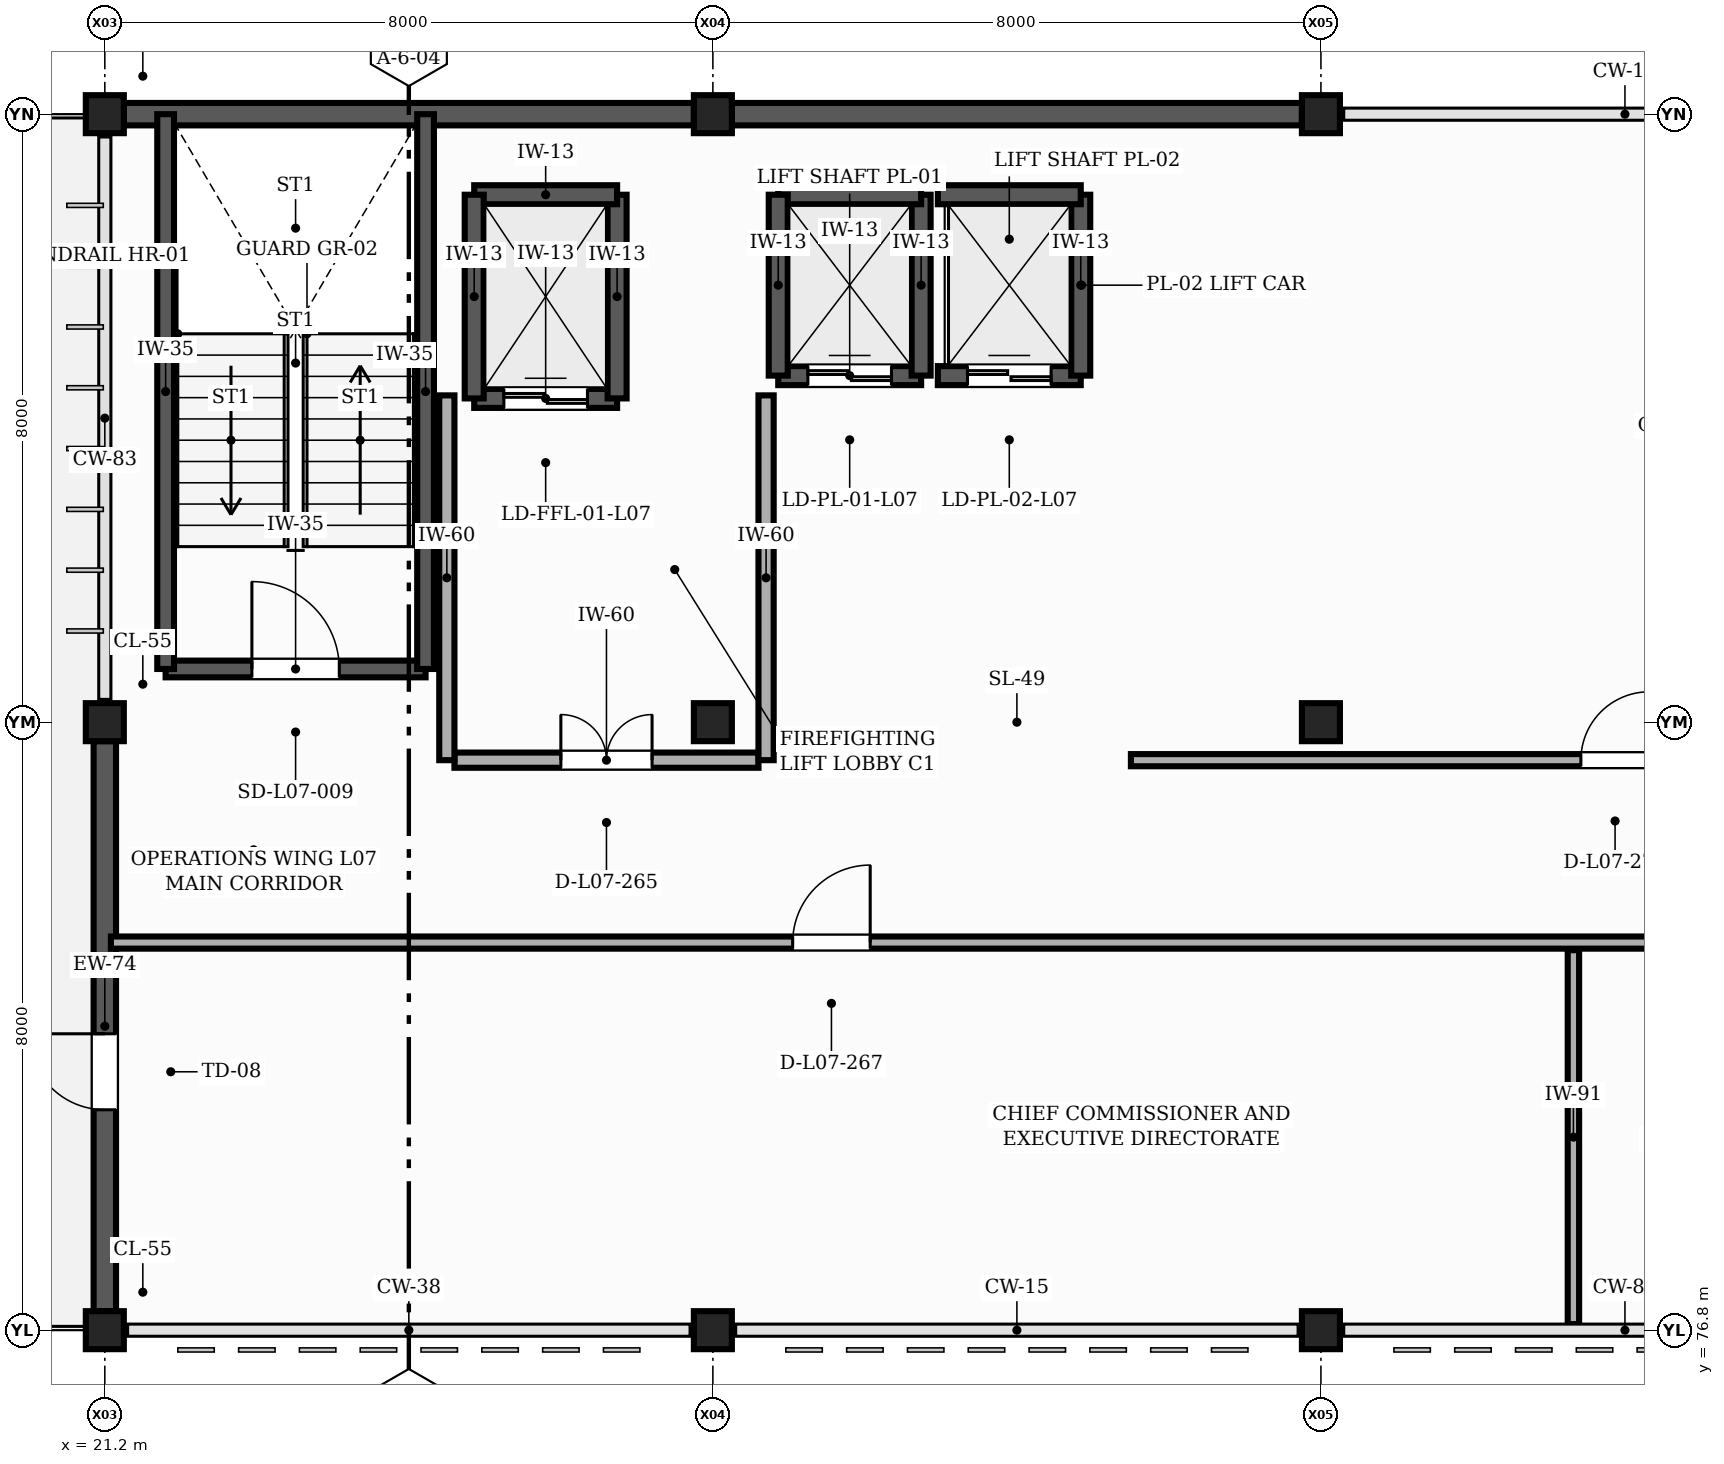
"""IFC4 building model, lengths in metres.
Left out: names, types, materials, properties, quantities, classifications, styles, units other than length and angle.
Written with IfcOpenShell. Run it as: python <this file> out.ifc"""

import sys

from ifc_helpers import new_model, si_unit, direction, frame, frame_2d, origin, origin_2d, place, context, subcontext, project, spatial, rectangle, extrude, element, fill, save


model = new_model("IFC4")
c1 = context("Model", 3, precision=1e-05, world=origin(), true_north=direction((0.0, 1.0)))
c2 = subcontext(c1, "Body", "Model", "MODEL_VIEW")
j1 = project(units=[si_unit("LENGTHUNIT", "METRE"), si_unit("PLANEANGLEUNIT", "RADIAN")], contexts=[c1])
p1 = place(None, origin())
s1 = spatial("IfcSite", under=j1, at=p1, CompositionType="ELEMENT")
p2 = place(p1, origin())
s2 = spatial("IfcBuilding", under=s1, at=p2, CompositionType="ELEMENT")
p3 = place(p2, frame((0.0, 0.0, 29.7)))
s3 = spatial("IfcBuildingStorey", under=s2, at=p3, CompositionType="ELEMENT", Elevation=29.7)
for number, where, z_axis, x_axis in (
    (1, (21.2, 76.8, 0.0), (0.0, 0.0, 1.0), (1.0, 0.0, 0.0)),
    (2, (21.2, 84.8, 0.0), (0.0, 0.0, 1.0), (1.0, 0.0, 0.0)),
    (3, (21.2, 92.8, 0.0), (0.0, 0.0, 1.0), (1.0, 0.0, 0.0)),
    (4, (29.2, 76.8, 0.0), (0.0, 0.0, 1.0), (1.0, 0.0, 0.0)),
    (5, (29.2, 84.8, 0.0), (0.0, 0.0, 1.0), (1.0, 0.0, 0.0)),
    (6, (29.2, 92.8, 0.0), (0.0, 0.0, 1.0), (1.0, 0.0, 0.0)),
    (7, (37.2, 76.8, 0.0), (0.0, 0.0, 1.0), (1.0, 0.0, 0.0)),
    (8, (37.2, 84.8, 0.0), (0.0, 0.0, 1.0), (1.0, 0.0, 0.0)),
    (9, (37.2, 92.8, 0.0), (0.0, 0.0, 1.0), (1.0, 0.0, 0.0)),
):
    element("IfcColumn", number, at=place(p3, frame(where, z_axis=z_axis, x_axis=x_axis)), inside=s3, PredefinedType="COLUMN", context=c2, shape_type="SweptSolid", body=[
        extrude(rectangle(XDim=0.5, YDim=0.5, at=origin_2d()), origin(), (0.0, 0.0, 1.0), 3.9),
    ])
p4 = place(p3, frame((36.95, 92.8, 0.0), z_axis=(0.0, 0.0, 1.0), x_axis=(-1.0, 0.0, 0.0)))
e10 = element("IfcWall", 10, at=p4, inside=s3, PredefinedType="SOLIDWALL", context=c2, shape_type="SweptSolid", body=[
    extrude(rectangle(XDim=7.5, YDim=0.295, at=frame_2d((3.75, 0.0))), origin(), (0.0, 0.0, 1.0), 2.98),
])
p5 = place(p3, frame((28.95, 92.8, 0.0), z_axis=(0.0, 0.0, 1.0), x_axis=(-1.0, 0.0, 0.0)))
e11 = element("IfcWall", 11, at=p5, inside=s3, PredefinedType="SOLIDWALL", context=c2, shape_type="SweptSolid", body=[
    extrude(rectangle(XDim=7.5, YDim=0.295, at=frame_2d((3.75, 0.0))), origin(), (0.0, 0.0, 1.0), 3.64),
])
p6 = place(p3, frame((21.2, 84.55, 0.0), z_axis=(0.0, 0.0, 1.0), x_axis=(0.0, -1.0, 0.0)))
e12 = element("IfcWall", 12, at=p6, inside=s3, PredefinedType="SOLIDWALL", context=c2, shape_type="SweptSolid", body=[
    extrude(rectangle(XDim=7.5, YDim=0.295, at=frame_2d((3.75, 0.0))), origin(), (0.0, 0.0, 1.0), 2.98),
])
p7 = place(p6, frame((3.85, 0.0, 0.0)))
e13 = element("IfcOpeningElement", 13, at=p7, cuts=e12, PredefinedType="OPENING", context=c2, shape_type="SweptSolid", body=[
    extrude(rectangle(XDim=1.0, YDim=2.15, at=frame_2d((0.5, 1.075))), frame((0.0, 0.157, 0.0), z_axis=(0.0, -1.0, 0.0), x_axis=(1.0, 0.0, 0.0)), (0.0, 0.0, 1.0), 0.315),
])
p8 = place(p3, frame((22.0, 85.5, 0.0), z_axis=(0.0, 0.0, 1.0), x_axis=(1.0, 0.0, 0.0)))
e14 = element("IfcWall", 14, at=p8, inside=s3, PredefinedType="SHEAR", context=c2, shape_type="SweptSolid", body=[
    extrude(rectangle(XDim=3.42, YDim=0.22, at=frame_2d((1.71, 0.0))), origin(), (0.0, 0.0, 1.0), 3.9),
])
p9 = place(p8, frame((1.135, 0.0, 0.0)))
e15 = element("IfcOpeningElement", 15, at=p9, cuts=e14, PredefinedType="OPENING", context=c2, shape_type="SweptSolid", body=[
    extrude(rectangle(XDim=1.15, YDim=2.15, at=frame_2d((0.575, 1.075))), frame((0.0, 0.12, 0.0), z_axis=(0.0, -1.0, 0.0), x_axis=(1.0, 0.0, 0.0)), (0.0, 0.0, 1.0), 0.24),
])
for number, where, z_axis, x_axis in (
    (16, (25.42, 85.5, 0.0), (0.0, 0.0, 1.0), (0.0, 1.0, 0.0)),
    (17, (22.0, 92.8, 0.0), (0.0, 0.0, 1.0), (0.0, -1.0, 0.0)),
):
    element("IfcWall", number, at=place(p3, frame(where, z_axis=z_axis, x_axis=x_axis)), inside=s3, PredefinedType="SHEAR", context=c2, shape_type="SweptSolid", body=[
        extrude(rectangle(XDim=7.3, YDim=0.22, at=frame_2d((3.65, 0.0))), origin(), (0.0, 0.0, 1.0), 3.9),
    ])
p10 = place(p3, frame((26.06, 89.06, 0.0), z_axis=(0.0, 0.0, 1.0), x_axis=(1.0, 0.0, 0.0)))
e18 = element("IfcWall", 18, at=p10, inside=s3, PredefinedType="SHEAR", context=c2, shape_type="SweptSolid", body=[
    extrude(rectangle(XDim=1.88, YDim=0.25, at=frame_2d((0.94, 0.0))), origin(), (0.0, 0.0, 1.0), 5.52),
])
p11 = place(p10, frame((0.39, 0.0, 0.0)))
e19 = element("IfcOpeningElement", 19, at=p11, cuts=e18, PredefinedType="OPENING", context=c2, shape_type="SweptSolid", body=[
    extrude(rectangle(XDim=1.1, YDim=2.2, at=frame_2d((0.55, 1.1))), frame((0.0, 0.135, 0.0), z_axis=(0.0, -1.0, 0.0), x_axis=(1.0, 0.0, 0.0)), (0.0, 0.0, 1.0), 0.27),
])
p12 = place(p3, frame((27.94, 89.06, 0.0), z_axis=(0.0, 0.0, 1.0), x_axis=(0.0, 1.0, 0.0)))
e20 = element("IfcWall", 20, at=p12, inside=s3, PredefinedType="SHEAR", context=c2, shape_type="SweptSolid", body=[
    extrude(rectangle(XDim=2.68, YDim=0.25, at=frame_2d((1.34, 0.0))), origin(), (0.0, 0.0, 1.0), 5.52),
])
p13 = place(p3, frame((27.94, 91.74, 0.0), z_axis=(0.0, 0.0, 1.0), x_axis=(-1.0, 0.0, 0.0)))
e21 = element("IfcWall", 21, at=p13, inside=s3, PredefinedType="SHEAR", context=c2, shape_type="SweptSolid", body=[
    extrude(rectangle(XDim=1.88, YDim=0.25, at=frame_2d((0.94, 0.0))), origin(), (0.0, 0.0, 1.0), 5.52),
])
p14 = place(p3, frame((26.06, 91.74, 0.0), z_axis=(0.0, 0.0, 1.0), x_axis=(0.0, -1.0, 0.0)))
e22 = element("IfcWall", 22, at=p14, inside=s3, PredefinedType="SHEAR", context=c2, shape_type="SweptSolid", body=[
    extrude(rectangle(XDim=2.68, YDim=0.25, at=frame_2d((1.34, 0.0))), origin(), (0.0, 0.0, 1.0), 5.52),
])
p15 = place(p3, frame((30.06, 89.36, 0.0), z_axis=(0.0, 0.0, 1.0), x_axis=(1.0, 0.0, 0.0)))
e23 = element("IfcWall", 23, at=p15, inside=s3, PredefinedType="SHEAR", context=c2, shape_type="SweptSolid", body=[
    extrude(rectangle(XDim=1.88, YDim=0.25, at=frame_2d((0.94, 0.0))), origin(), (0.0, 0.0, 1.0), 5.52),
])
p16 = place(p15, frame((0.39, 0.0, 0.0)))
e24 = element("IfcOpeningElement", 24, at=p16, cuts=e23, PredefinedType="OPENING", context=c2, shape_type="SweptSolid", body=[
    extrude(rectangle(XDim=1.1, YDim=2.2, at=frame_2d((0.55, 1.1))), frame((0.0, 0.135, 0.0), z_axis=(0.0, -1.0, 0.0), x_axis=(1.0, 0.0, 0.0)), (0.0, 0.0, 1.0), 0.27),
])
p17 = place(p3, frame((31.94, 89.36, 0.0), z_axis=(0.0, 0.0, 1.0), x_axis=(0.0, 1.0, 0.0)))
e25 = element("IfcWall", 25, at=p17, inside=s3, PredefinedType="SHEAR", context=c2, shape_type="SweptSolid", body=[
    extrude(rectangle(XDim=2.38, YDim=0.25, at=frame_2d((1.19, 0.0))), origin(), (0.0, 0.0, 1.0), 5.52),
])
p18 = place(p3, frame((31.94, 91.74, 0.0), z_axis=(0.0, 0.0, 1.0), x_axis=(-1.0, 0.0, 0.0)))
e26 = element("IfcWall", 26, at=p18, inside=s3, PredefinedType="SHEAR", context=c2, shape_type="SweptSolid", body=[
    extrude(rectangle(XDim=1.88, YDim=0.25, at=frame_2d((0.94, 0.0))), origin(), (0.0, 0.0, 1.0), 5.52),
])
p19 = place(p3, frame((30.06, 91.74, 0.0), z_axis=(0.0, 0.0, 1.0), x_axis=(0.0, -1.0, 0.0)))
e27 = element("IfcWall", 27, at=p19, inside=s3, PredefinedType="SHEAR", context=c2, shape_type="SweptSolid", body=[
    extrude(rectangle(XDim=2.38, YDim=0.25, at=frame_2d((1.19, 0.0))), origin(), (0.0, 0.0, 1.0), 5.52),
])
p20 = place(p3, frame((32.16, 89.36, 0.0), z_axis=(0.0, 0.0, 1.0), x_axis=(1.0, 0.0, 0.0)))
e28 = element("IfcWall", 28, at=p20, inside=s3, PredefinedType="SHEAR", context=c2, shape_type="SweptSolid", body=[
    extrude(rectangle(XDim=1.88, YDim=0.25, at=frame_2d((0.94, 0.0))), origin(), (0.0, 0.0, 1.0), 5.52),
])
p21 = place(p20, frame((0.39, 0.0, 0.0)))
e29 = element("IfcOpeningElement", 29, at=p21, cuts=e28, PredefinedType="OPENING", context=c2, shape_type="SweptSolid", body=[
    extrude(rectangle(XDim=1.1, YDim=2.2, at=frame_2d((0.55, 1.1))), frame((0.0, 0.135, 0.0), z_axis=(0.0, -1.0, 0.0), x_axis=(1.0, 0.0, 0.0)), (0.0, 0.0, 1.0), 0.27),
])
p22 = place(p3, frame((34.04, 89.36, 0.0), z_axis=(0.0, 0.0, 1.0), x_axis=(0.0, 1.0, 0.0)))
e30 = element("IfcWall", 30, at=p22, inside=s3, PredefinedType="SHEAR", context=c2, shape_type="SweptSolid", body=[
    extrude(rectangle(XDim=2.38, YDim=0.25, at=frame_2d((1.19, 0.0))), origin(), (0.0, 0.0, 1.0), 5.52),
])
p23 = place(p3, frame((34.04, 91.74, 0.0), z_axis=(0.0, 0.0, 1.0), x_axis=(-1.0, 0.0, 0.0)))
e31 = element("IfcWall", 31, at=p23, inside=s3, PredefinedType="SHEAR", context=c2, shape_type="SweptSolid", body=[
    extrude(rectangle(XDim=1.88, YDim=0.25, at=frame_2d((0.94, 0.0))), origin(), (0.0, 0.0, 1.0), 5.52),
])
p24 = place(p3, frame((25.8, 84.3, 0.0), z_axis=(0.0, 0.0, 1.0), x_axis=(1.0, 0.0, 0.0)))
e32 = element("IfcWall", 32, at=p24, inside=s3, PredefinedType="PARTITIONING", context=c2, shape_type="SweptSolid", body=[
    extrude(rectangle(XDim=4.0, YDim=0.2, at=frame_2d((2.0, 0.0))), origin(), (0.0, 0.0, 1.0), 2.915),
])
p25 = place(p24, frame((1.4, 0.0, 0.0)))
e33 = element("IfcOpeningElement", 33, at=p25, cuts=e32, PredefinedType="OPENING", context=c2, shape_type="SweptSolid", body=[
    extrude(rectangle(XDim=1.2, YDim=2.15, at=frame_2d((0.6, 1.075))), frame((0.0, 0.11, 0.0), z_axis=(0.0, -1.0, 0.0), x_axis=(1.0, 0.0, 0.0)), (0.0, 0.0, 1.0), 0.22),
])
p26 = place(p3, frame((25.7, 84.3, 0.0), z_axis=(0.0, 0.0, 1.0), x_axis=(0.0, 1.0, 0.0)))
e34 = element("IfcWall", 34, at=p26, inside=s3, PredefinedType="PARTITIONING", context=c2, shape_type="SweptSolid", body=[
    extrude(rectangle(XDim=4.8, YDim=0.2, at=frame_2d((2.4, 0.0))), origin(), (0.0, 0.0, 1.0), 3.065),
])
p27 = place(p3, frame((29.9, 84.3, 0.0), z_axis=(0.0, 0.0, 1.0), x_axis=(0.0, 1.0, 0.0)))
e35 = element("IfcWall", 35, at=p27, inside=s3, PredefinedType="PARTITIONING", context=c2, shape_type="SweptSolid", body=[
    extrude(rectangle(XDim=4.8, YDim=0.2, at=frame_2d((2.4, 0.0))), origin(), (0.0, 0.0, 1.0), 2.765),
])
p28 = place(p3, frame((40.522, 76.88, 0.0), z_axis=(0.0, 0.0, 1.0), x_axis=(0.0, 1.0, 0.0)))
e36 = element("IfcWall", 36, at=p28, inside=s3, PredefinedType="PARTITIONING", context=c2, shape_type="SweptSolid", body=[
    extrude(rectangle(XDim=4.92, YDim=0.15, at=frame_2d((2.46, 0.0))), origin(), (0.0, 0.0, 1.0), 2.965),
])
p29 = place(p3, frame((21.28, 81.9, 0.0), z_axis=(0.0, 0.0, 1.0), x_axis=(1.0, 0.0, 0.0)))
e37 = element("IfcWall", 37, at=p29, inside=s3, PredefinedType="PARTITIONING", context=c2, shape_type="SweptSolid", body=[
    extrude(rectangle(XDim=64.64, YDim=0.16, at=frame_2d((32.32, 0.0))), origin(), (0.0, 0.0, 1.0), 2.915),
])
p30 = place(p29, frame((8.97, 0.0, 0.0)))
e38 = element("IfcOpeningElement", 38, at=p30, cuts=e37, PredefinedType="OPENING", context=c2, shape_type="SweptSolid", body=[
    extrude(rectangle(XDim=1.02, YDim=2.12, at=frame_2d((0.51, 1.06))), frame((0.0, 0.09, 0.0), z_axis=(0.0, -1.0, 0.0), x_axis=(1.0, 0.0, 0.0)), (0.0, 0.0, 1.0), 0.18),
])
p31 = place(p29, frame((26.84, 0.0, 0.0)))
e39 = element("IfcOpeningElement", 39, at=p31, cuts=e37, PredefinedType="OPENING", context=c2, shape_type="SweptSolid", body=[
    extrude(rectangle(XDim=1.05, YDim=2.1, at=frame_2d((0.525, 1.05))), frame((0.0, 0.09, 0.0), z_axis=(0.0, -1.0, 0.0), x_axis=(1.0, 0.0, 0.0)), (0.0, 0.0, 1.0), 0.18),
])
p32 = place(p29, frame((42.89, 0.0, 0.0)))
e40 = element("IfcOpeningElement", 40, at=p32, cuts=e37, PredefinedType="OPENING", context=c2, shape_type="SweptSolid", body=[
    extrude(rectangle(XDim=1.08, YDim=2.14, at=frame_2d((0.54, 1.07))), frame((0.0, 0.09, 0.0), z_axis=(0.0, -1.0, 0.0), x_axis=(1.0, 0.0, 0.0)), (0.0, 0.0, 1.0), 0.18),
])
p33 = place(p29, frame((57.2, 0.0, 0.0)))
e41 = element("IfcOpeningElement", 41, at=p33, cuts=e37, PredefinedType="OPENING", context=c2, shape_type="SweptSolid", body=[
    extrude(rectangle(XDim=1.1, YDim=2.1, at=frame_2d((0.55, 1.05))), frame((0.0, 0.09, 0.0), z_axis=(0.0, -1.0, 0.0), x_axis=(1.0, 0.0, 0.0)), (0.0, 0.0, 1.0), 0.18),
])
p34 = place(p3, frame((34.7, 84.3, 0.0), z_axis=(0.0, 0.0, 1.0), x_axis=(1.0, 0.0, 0.0)))
e42 = element("IfcWall", 42, at=p34, inside=s3, PredefinedType="PARTITIONING", context=c2, shape_type="SweptSolid", body=[
    extrude(rectangle(XDim=35.4, YDim=0.16, at=frame_2d((17.7, 0.0))), origin(), (0.0, 0.0, 1.0), 2.915),
])
p35 = place(p34, frame((5.92, 0.0, 0.0)))
e43 = element("IfcOpeningElement", 43, at=p35, cuts=e42, PredefinedType="OPENING", context=c2, shape_type="SweptSolid", body=[
    extrude(rectangle(XDim=0.9, YDim=2.1, at=frame_2d((0.45, 1.05))), frame((0.0, 0.09, 0.0), z_axis=(0.0, -1.0, 0.0), x_axis=(1.0, 0.0, 0.0)), (0.0, 0.0, 1.0), 0.18),
])
p36 = place(p34, frame((17.2, 0.0, 0.0)))
e44 = element("IfcOpeningElement", 44, at=p36, cuts=e42, PredefinedType="OPENING", context=c2, shape_type="SweptSolid", body=[
    extrude(rectangle(XDim=0.95, YDim=2.15, at=frame_2d((0.475, 1.075))), frame((0.0, 0.09, 0.0), z_axis=(0.0, -1.0, 0.0), x_axis=(1.0, 0.0, 0.0)), (0.0, 0.0, 1.0), 0.18),
])
p37 = place(p34, frame((28.48, 0.0, 0.0)))
e45 = element("IfcOpeningElement", 45, at=p37, cuts=e42, PredefinedType="OPENING", context=c2, shape_type="SweptSolid", body=[
    extrude(rectangle(XDim=0.95, YDim=2.1, at=frame_2d((0.475, 1.05))), frame((0.0, 0.09, 0.0), z_axis=(0.0, -1.0, 0.0), x_axis=(1.0, 0.0, 0.0)), (0.0, 0.0, 1.0), 0.18),
])
p38 = place(p7, frame((1.0, 0.0, 0.0), z_axis=(0.0, 0.0, 1.0), x_axis=(-1.0, 0.0, 0.0)))
e46 = element("IfcDoor", 46, at=p38, inside=s3, OperationType="SINGLE_SWING_RIGHT", PredefinedType="DOOR", context=c2, shape_type="SweptSolid", body=[
    extrude(rectangle(XDim=1.0, YDim=2.15, at=frame_2d((0.5, 1.075))), frame((0.0, 0.025, 0.0), z_axis=(0.0, -1.0, 0.0), x_axis=(1.0, 0.0, 0.0)), (0.0, 0.0, 1.0), 0.05),
])
fill(e13, e46)
p39 = place(p9, origin())
e47 = element("IfcDoor", 47, at=p39, inside=s3, OperationType="SINGLE_SWING_LEFT", PredefinedType="DOOR", context=c2, shape_type="SweptSolid", body=[
    extrude(rectangle(XDim=1.15, YDim=2.15, at=frame_2d((0.575, 1.075))), frame((0.0, 0.025, 0.0), z_axis=(0.0, -1.0, 0.0), x_axis=(1.0, 0.0, 0.0)), (0.0, 0.0, 1.0), 0.05),
])
fill(e15, e47)
p40 = place(p11, origin())
e48 = element("IfcDoor", 48, at=p40, inside=s3, OperationType="DOUBLE_DOOR_SLIDING", PredefinedType="DOOR", context=c2, shape_type="SweptSolid", body=[
    extrude(rectangle(XDim=1.1, YDim=2.2, at=frame_2d((0.55, 1.1))), frame((0.0, 0.025, 0.0), z_axis=(0.0, -1.0, 0.0), x_axis=(1.0, 0.0, 0.0)), (0.0, 0.0, 1.0), 0.05),
])
fill(e19, e48)
p41 = place(p16, origin())
e49 = element("IfcDoor", 49, at=p41, inside=s3, OperationType="DOUBLE_DOOR_SLIDING", PredefinedType="DOOR", context=c2, shape_type="SweptSolid", body=[
    extrude(rectangle(XDim=1.1, YDim=2.2, at=frame_2d((0.55, 1.1))), frame((0.0, 0.025, 0.0), z_axis=(0.0, -1.0, 0.0), x_axis=(1.0, 0.0, 0.0)), (0.0, 0.0, 1.0), 0.05),
])
fill(e24, e49)
p42 = place(p21, origin())
e50 = element("IfcDoor", 50, at=p42, inside=s3, OperationType="DOUBLE_DOOR_SLIDING", PredefinedType="DOOR", context=c2, shape_type="SweptSolid", body=[
    extrude(rectangle(XDim=1.1, YDim=2.2, at=frame_2d((0.55, 1.1))), frame((0.0, 0.025, 0.0), z_axis=(0.0, -1.0, 0.0), x_axis=(1.0, 0.0, 0.0)), (0.0, 0.0, 1.0), 0.05),
])
fill(e29, e50)
p43 = place(p25, origin())
e51 = element("IfcDoor", 51, at=p43, inside=s3, OperationType="DOUBLE_DOOR_SINGLE_SWING", PredefinedType="DOOR", context=c2, shape_type="SweptSolid", body=[
    extrude(rectangle(XDim=1.2, YDim=2.15, at=frame_2d((0.6, 1.075))), frame((0.0, 0.025, 0.0), z_axis=(0.0, -1.0, 0.0), x_axis=(1.0, 0.0, 0.0)), (0.0, 0.0, 1.0), 0.05),
])
fill(e33, e51)
p44 = place(p30, origin())
e52 = element("IfcDoor", 52, at=p44, inside=s3, OperationType="SINGLE_SWING_RIGHT", PredefinedType="DOOR", context=c2, shape_type="SweptSolid", body=[
    extrude(rectangle(XDim=1.02, YDim=2.12, at=frame_2d((0.51, 1.06))), frame((0.0, 0.025, 0.0), z_axis=(0.0, -1.0, 0.0), x_axis=(1.0, 0.0, 0.0)), (0.0, 0.0, 1.0), 0.05),
])
fill(e38, e52)
p45 = place(p35, origin())
e53 = element("IfcDoor", 53, at=p45, inside=s3, OperationType="SINGLE_SWING_RIGHT", PredefinedType="DOOR", context=c2, shape_type="SweptSolid", body=[
    extrude(rectangle(XDim=0.9, YDim=2.1, at=frame_2d((0.45, 1.05))), frame((0.0, 0.025, 0.0), z_axis=(0.0, -1.0, 0.0), x_axis=(1.0, 0.0, 0.0)), (0.0, 0.0, 1.0), 0.05),
])
fill(e43, e53)
save(model, sys.argv[1])
